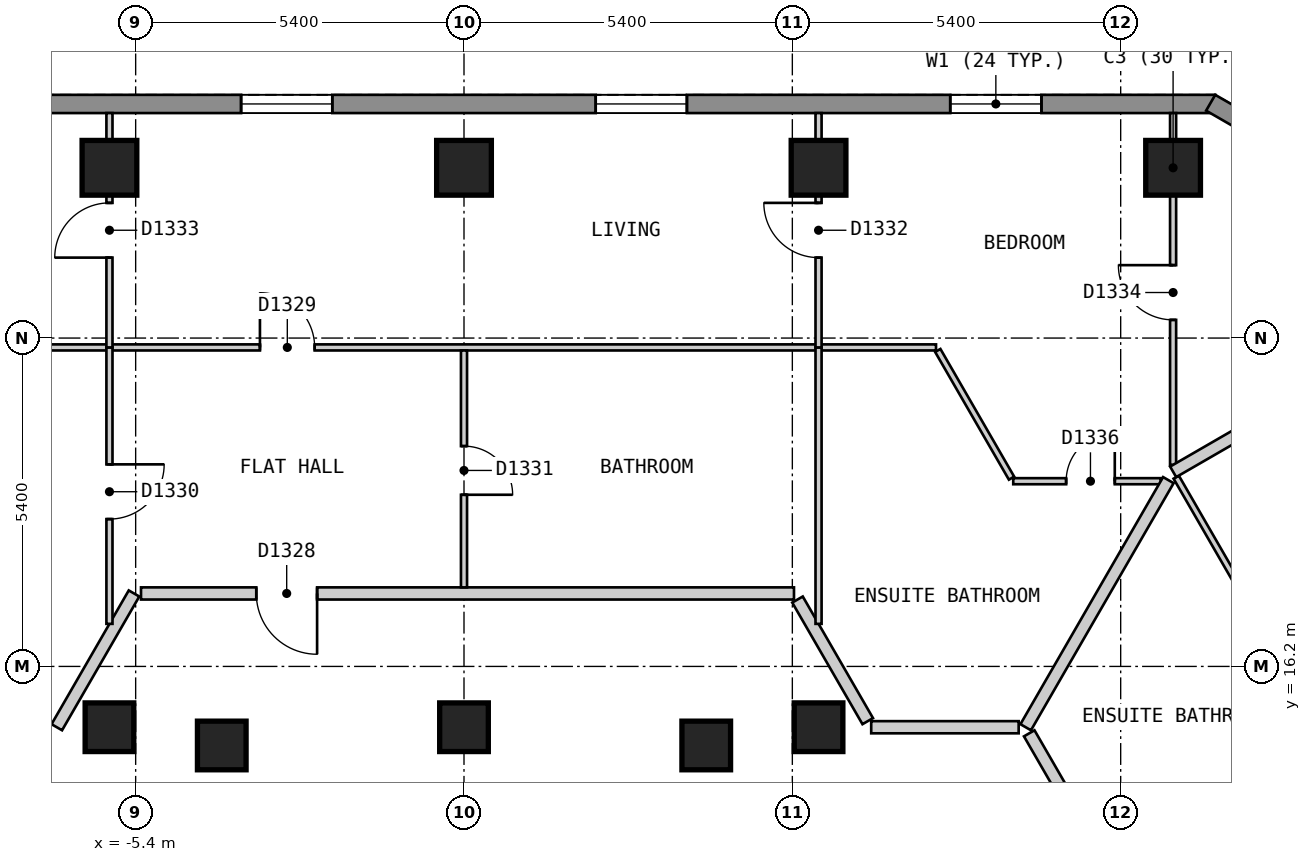
"""IFC4 building model, lengths in metres.
Left out: names, types, materials, properties, quantities, classifications, styles, units other than length and angle.
Written with IfcOpenShell. Run it as: python <this file> out.ifc"""

import sys

from ifc_helpers import new_model, si_unit, direction, frame, frame_2d, origin, origin_2d, place, context, subcontext, project, spatial, polyline, rectangle, outline, extrude, element, fill, save


model = new_model("IFC4")
c1 = context("Model", 3, precision=1e-05, world=origin(), true_north=direction((0.0, 1.0)))
c2 = subcontext(c1, "Body", "Model", "MODEL_VIEW")
j1 = project(units=[si_unit("LENGTHUNIT", "METRE"), si_unit("PLANEANGLEUNIT", "RADIAN")], contexts=[c1])
p1 = place(None, origin())
s1 = spatial("IfcSite", under=j1, at=p1, CompositionType="ELEMENT")
p2 = place(p1, origin())
s2 = spatial("IfcBuilding", under=s1, at=p2, CompositionType="ELEMENT")
p3 = place(p2, frame((0.0, 0.0, 147.6)))
s3 = spatial("IfcBuildingStorey", under=s2, at=p3, CompositionType="ELEMENT", Elevation=147.6)
for number, where, z_axis, x_axis in (
    (1, (11.662, 24.4, 0.0), (0.0, 0.0, 1.0), (-1.0, 0.0, 0.0)),
    (2, (5.831, 24.4, 0.0), (0.0, 0.0, 1.0), (-1.0, 0.0, 0.0)),
    (3, (0.0, 24.4, 0.0), (0.0, 0.0, 1.0), (-1.0, 0.0, 0.0)),
    (4, (-5.831, 24.4, 0.0), (0.0, 0.0, 1.0), (-1.0, 0.0, 0.0)),
):
    element("IfcColumn", number, at=place(p3, frame(where, z_axis=z_axis, x_axis=x_axis)), inside=s3, PredefinedType="COLUMN", context=c2, shape_type="SweptSolid", body=[
        extrude(rectangle(XDim=0.9, YDim=0.9, at=origin_2d()), origin(), (0.0, 0.0, 1.0), 3.0),
    ])
for number, where, z_axis, x_axis in (
    (5, (5.831, 15.2, 0.0), (0.0, 0.0, 1.0), (-1.0, 0.0, 0.0)),
    (6, (3.984, 14.9, 0.0), (0.0, 0.0, 1.0), (1.0, 0.0, 0.0)),
    (7, (0.0, 15.2, 0.0), (0.0, 0.0, 1.0), (-1.0, 0.0, 0.0)),
    (8, (-3.984, 14.9, 0.0), (0.0, 0.0, 1.0), (1.0, 0.0, 0.0)),
    (9, (-5.831, 15.2, 0.0), (0.0, 0.0, 1.0), (-1.0, 0.0, 0.0)),
):
    element("IfcColumn", number, at=place(p3, frame(where, z_axis=z_axis, x_axis=x_axis)), inside=s3, PredefinedType="COLUMN", context=c2, shape_type="SweptSolid", body=[
        extrude(rectangle(XDim=0.8, YDim=0.8, at=origin_2d()), origin(), (0.0, 0.0, 1.0), 3.0),
    ])
p4 = place(p3, frame((12.355, 25.45, 0.0), z_axis=(0.0, 0.0, 1.0), x_axis=(-1.0, 0.0, 0.0)))
e10 = element("IfcWall", 10, at=p4, inside=s3, PredefinedType="SOLIDWALL", context=c2, shape_type="SweptSolid", body=[
    extrude(outline(polyline([(0.0, -0.15), (24.71, -0.15), (24.63, 0.15), (0.08, 0.15), (0.0, -0.15)])), origin(), (0.0, 0.0, 1.0), 2.7),
])
p5 = place(p4, frame((2.858, 0.0, 0.15)))
e11 = element("IfcOpeningElement", 11, at=p5, cuts=e10, PredefinedType="OPENING", context=c2, shape_type="SweptSolid", body=[
    extrude(rectangle(XDim=1.5, YDim=2.1, at=frame_2d((0.75, 1.05))), frame((0.0, 0.16, 0.0), z_axis=(0.0, -1.0, 0.0), x_axis=(1.0, 0.0, 0.0)), (0.0, 0.0, 1.0), 0.32),
])
p6 = place(p4, frame((8.689, 0.0, 0.15)))
e12 = element("IfcOpeningElement", 12, at=p6, cuts=e10, PredefinedType="OPENING", context=c2, shape_type="SweptSolid", body=[
    extrude(rectangle(XDim=1.5, YDim=2.1, at=frame_2d((0.75, 1.05))), frame((0.0, 0.16, 0.0), z_axis=(0.0, -1.0, 0.0), x_axis=(1.0, 0.0, 0.0)), (0.0, 0.0, 1.0), 0.32),
])
p7 = place(p4, frame((14.521, 0.0, 0.15)))
e13 = element("IfcOpeningElement", 13, at=p7, cuts=e10, PredefinedType="OPENING", context=c2, shape_type="SweptSolid", body=[
    extrude(rectangle(XDim=1.5, YDim=2.1, at=frame_2d((0.75, 1.05))), frame((0.0, 0.16, 0.0), z_axis=(0.0, -1.0, 0.0), x_axis=(1.0, 0.0, 0.0)), (0.0, 0.0, 1.0), 0.32),
])
p8 = place(p4, frame((20.352, 0.0, 0.15)))
e14 = element("IfcOpeningElement", 14, at=p8, cuts=e10, PredefinedType="OPENING", context=c2, shape_type="SweptSolid", body=[
    extrude(rectangle(XDim=1.5, YDim=2.1, at=frame_2d((0.75, 1.05))), frame((0.0, 0.16, 0.0), z_axis=(0.0, -1.0, 0.0), x_axis=(1.0, 0.0, 0.0)), (0.0, 0.0, 1.0), 0.32),
])
p9 = place(p3, frame((16.61, 22.97, 0.0), z_axis=(0.0, 0.0, 1.0), x_axis=(-0.866022959057, 0.500004234368, 0.0)))
e15 = element("IfcWall", 15, at=p9, inside=s3, PredefinedType="SOLIDWALL", context=c2, shape_type="SweptSolid", body=[
    extrude(outline(polyline([(0.0, -0.15), (5.0, -0.15), (4.92, 0.15), (0.08, 0.15), (0.0, -0.15)])), origin(), (0.0, 0.0, 1.0), 2.7),
])
p10 = place(p9, frame((0.65, 0.0, 0.15)))
e16 = element("IfcOpeningElement", 16, at=p10, cuts=e15, PredefinedType="OPENING", context=c2, shape_type="SweptSolid", body=[
    extrude(rectangle(XDim=1.2, YDim=2.1, at=frame_2d((0.6, 1.05))), frame((0.0, 0.16, 0.0), z_axis=(0.0, -1.0, 0.0), x_axis=(1.0, 0.0, 0.0)), (0.0, 0.0, 1.0), 0.32),
])
p11 = place(p3, frame((5.485, 17.3, 0.0), z_axis=(0.0, 0.0, 1.0), x_axis=(0.500027479704, -0.866009537788, 0.0)))
e17 = element("IfcWall", 17, at=p11, inside=s3, PredefinedType="PARTITIONING", context=c2, shape_type="SweptSolid", body=[
    extrude(rectangle(XDim=2.309, YDim=0.2, at=frame_2d((1.155, 0.0))), origin(), (0.0, 0.0, 1.0), 2.7),
])
p12 = place(p3, frame((9.296, 15.1, 0.0), z_axis=(0.0, 0.0, 1.0), x_axis=(0.499974024244, -0.866040400375, 0.0)))
e18 = element("IfcWall", 18, at=p12, inside=s3, PredefinedType="PARTITIONING", context=c2, shape_type="SweptSolid", body=[
    extrude(rectangle(XDim=16.857, YDim=0.2, at=frame_2d((8.429, 0.0))), origin(), (0.0, 0.0, 1.0), 2.7),
])
p13 = place(p12, frame((5.209, 0.0, 0.0)))
e19 = element("IfcOpeningElement", 19, at=p13, cuts=e18, PredefinedType="OPENING", context=c2, shape_type="SweptSolid", body=[
    extrude(rectangle(XDim=1.0, YDim=2.1, at=frame_2d((0.5, 1.05))), frame((0.0, 0.11, 0.0), z_axis=(0.0, -1.0, 0.0), x_axis=(1.0, 0.0, 0.0)), (0.0, 0.0, 1.0), 0.22),
])
p14 = place(p3, frame((6.697, 15.2, 0.0), z_axis=(0.0, 0.0, 1.0), x_axis=(1.0, 0.0, 0.0)))
e20 = element("IfcWall", 20, at=p14, inside=s3, PredefinedType="PARTITIONING", context=c2, shape_type="SweptSolid", body=[
    extrude(rectangle(XDim=2.425, YDim=0.2, at=frame_2d((1.212, 0.0))), origin(), (0.0, 0.0, 1.0), 2.7),
])
p15 = place(p3, frame((-5.312, 17.4, 0.0), z_axis=(0.0, 0.0, 1.0), x_axis=(1.0, 0.0, 0.0)))
e21 = element("IfcWall", 21, at=p15, inside=s3, PredefinedType="PARTITIONING", context=c2, shape_type="SweptSolid", body=[
    extrude(rectangle(XDim=10.739, YDim=0.2, at=frame_2d((5.37, 0.0))), origin(), (0.0, 0.0, 1.0), 2.7),
])
p16 = place(p15, frame((1.896, 0.0, 0.0)))
e22 = element("IfcOpeningElement", 22, at=p16, cuts=e21, PredefinedType="OPENING", context=c2, shape_type="SweptSolid", body=[
    extrude(rectangle(XDim=1.0, YDim=2.1, at=frame_2d((0.5, 1.05))), frame((0.0, 0.11, 0.0), z_axis=(0.0, -1.0, 0.0), x_axis=(1.0, 0.0, 0.0)), (0.0, 0.0, 1.0), 0.22),
])
p17 = place(p3, frame((-6.697, 15.2, 0.0), z_axis=(0.0, 0.0, 1.0), x_axis=(0.499963722229, 0.866046347752, 0.0)))
e23 = element("IfcWall", 23, at=p17, inside=s3, PredefinedType="PARTITIONING", context=c2, shape_type="SweptSolid", body=[
    extrude(rectangle(XDim=2.54, YDim=0.2, at=frame_2d((1.27, 0.0))), origin(), (0.0, 0.0, 1.0), 2.7),
])
p18 = place(p3, frame((7.792, 21.396, 0.0), z_axis=(0.0, 0.0, 1.0), x_axis=(0.50012328804, -0.865954211699, 0.0)))
e24 = element("IfcWall", 24, at=p18, inside=s3, PredefinedType="PARTITIONING", context=c2, shape_type="SweptSolid", body=[
    extrude(rectangle(XDim=2.425, YDim=0.1, at=frame_2d((1.213, 0.0))), origin(), (0.0, 0.0, 1.0), 2.7),
])
p19 = place(p3, frame((11.713, 19.313, 0.0), z_axis=(0.0, 0.0, 1.0), x_axis=(0.499999523185, -0.866025679073, 0.0)))
e25 = element("IfcWall", 25, at=p19, inside=s3, PredefinedType="PARTITIONING", context=c2, shape_type="SweptSolid", body=[
    extrude(rectangle(XDim=21.738, YDim=0.1, at=frame_2d((10.869, 0.0))), origin(), (0.0, 0.0, 1.0), 2.7),
])
p20 = place(p19, frame((7.654, 0.0, 0.0)))
e26 = element("IfcOpeningElement", 26, at=p20, cuts=e25, PredefinedType="OPENING", context=c2, shape_type="SweptSolid", body=[
    extrude(rectangle(XDim=0.9, YDim=2.1, at=frame_2d((0.45, 1.05))), frame((0.0, 0.06, 0.0), z_axis=(0.0, -1.0, 0.0), x_axis=(1.0, 0.0, 0.0)), (0.0, 0.0, 1.0), 0.12),
])
p21 = place(p19, frame((13.202, 0.0, 0.0)))
e27 = element("IfcOpeningElement", 27, at=p21, cuts=e25, PredefinedType="OPENING", context=c2, shape_type="SweptSolid", body=[
    extrude(rectangle(XDim=0.8, YDim=2.1, at=frame_2d((0.4, 1.05))), frame((0.0, 0.06, 0.0), z_axis=(0.0, -1.0, 0.0), x_axis=(1.0, 0.0, 0.0)), (0.0, 0.0, 1.0), 0.12),
])
p22 = place(p19, frame((2.242, 0.0, 0.0)))
e28 = element("IfcOpeningElement", 28, at=p22, cuts=e25, PredefinedType="OPENING", context=c2, shape_type="SweptSolid", body=[
    extrude(rectangle(XDim=0.8, YDim=2.1, at=frame_2d((0.4, 1.05))), frame((0.0, 0.06, 0.0), z_axis=(0.0, -1.0, 0.0), x_axis=(1.0, 0.0, 0.0)), (0.0, 0.0, 1.0), 0.12),
])
p23 = place(p19, frame((18.696, 0.0, 0.0)))
e29 = element("IfcOpeningElement", 29, at=p23, cuts=e25, PredefinedType="OPENING", context=c2, shape_type="SweptSolid", body=[
    extrude(rectangle(XDim=0.8, YDim=2.1, at=frame_2d((0.4, 1.05))), frame((0.0, 0.06, 0.0), z_axis=(0.0, -1.0, 0.0), x_axis=(1.0, 0.0, 0.0)), (0.0, 0.0, 1.0), 0.12),
])
p24 = place(p3, frame((9.033, 19.246, 0.0), z_axis=(0.0, 0.0, 1.0), x_axis=(1.0, 0.0, 0.0)))
e30 = element("IfcWall", 30, at=p24, inside=s3, PredefinedType="PARTITIONING", context=c2, shape_type="SweptSolid", body=[
    extrude(rectangle(XDim=2.425, YDim=0.1, at=frame_2d((1.212, 0.0))), origin(), (0.0, 0.0, 1.0), 2.7),
])
p25 = place(p24, frame((0.87, 0.0, 0.0)))
e31 = element("IfcOpeningElement", 31, at=p25, cuts=e30, PredefinedType="OPENING", context=c2, shape_type="SweptSolid", body=[
    extrude(rectangle(XDim=0.8, YDim=2.1, at=frame_2d((0.4, 1.05))), frame((0.0, 0.06, 0.0), z_axis=(0.0, -1.0, 0.0), x_axis=(1.0, 0.0, 0.0)), (0.0, 0.0, 1.0), 0.12),
])
p26 = place(p3, frame((-7.706, 21.446, 0.0), z_axis=(0.0, 0.0, 1.0), x_axis=(1.0, 0.0, 0.0)))
e32 = element("IfcWall", 32, at=p26, inside=s3, PredefinedType="PARTITIONING", context=c2, shape_type="SweptSolid", body=[
    extrude(rectangle(XDim=15.469, YDim=0.1, at=frame_2d((7.734, 0.0))), origin(), (0.0, 0.0, 1.0), 2.7),
])
p27 = place(p26, frame((4.35, 0.0, 0.0)))
e33 = element("IfcOpeningElement", 33, at=p27, cuts=e32, PredefinedType="OPENING", context=c2, shape_type="SweptSolid", body=[
    extrude(rectangle(XDim=0.9, YDim=2.1, at=frame_2d((0.45, 1.05))), frame((0.0, 0.06, 0.0), z_axis=(0.0, -1.0, 0.0), x_axis=(1.0, 0.0, 0.0)), (0.0, 0.0, 1.0), 0.12),
])
p28 = place(p3, frame((5.831, 16.9, 0.0), z_axis=(0.0, 0.0, 1.0), x_axis=(0.0, 1.0, 0.0)))
e34 = element("IfcWall", 34, at=p28, inside=s3, PredefinedType="PARTITIONING", context=c2, shape_type="SweptSolid", body=[
    extrude(rectangle(XDim=4.546, YDim=0.1, at=frame_2d((2.273, 0.0))), origin(), (0.0, 0.0, 1.0), 2.7),
])
p29 = place(p3, frame((11.662, 19.514, 0.0), z_axis=(0.0, 0.0, 1.0), x_axis=(0.0, 1.0, 0.0)))
e35 = element("IfcWall", 35, at=p29, inside=s3, PredefinedType="PARTITIONING", context=c2, shape_type="SweptSolid", body=[
    extrude(rectangle(XDim=5.786, YDim=0.1, at=frame_2d((2.893, 0.0))), origin(), (0.0, 0.0, 1.0), 2.7),
])
p30 = place(p29, frame((2.385, 0.0, 0.0)))
e36 = element("IfcOpeningElement", 36, at=p30, cuts=e35, PredefinedType="OPENING", context=c2, shape_type="SweptSolid", body=[
    extrude(rectangle(XDim=0.9, YDim=2.1, at=frame_2d((0.45, 1.05))), frame((0.0, 0.06, 0.0), z_axis=(0.0, -1.0, 0.0), x_axis=(1.0, 0.0, 0.0)), (0.0, 0.0, 1.0), 0.12),
])
p31 = place(p3, frame((0.0, 17.5, 0.0), z_axis=(0.0, 0.0, 1.0), x_axis=(0.0, 1.0, 0.0)))
e37 = element("IfcWall", 37, at=p31, inside=s3, PredefinedType="PARTITIONING", context=c2, shape_type="SweptSolid", body=[
    extrude(rectangle(XDim=3.896, YDim=0.1, at=frame_2d((1.948, 0.0))), origin(), (0.0, 0.0, 1.0), 2.7),
])
p32 = place(p31, frame((1.523, 0.0, 0.0)))
e38 = element("IfcOpeningElement", 38, at=p32, cuts=e37, PredefinedType="OPENING", context=c2, shape_type="SweptSolid", body=[
    extrude(rectangle(XDim=0.8, YDim=2.1, at=frame_2d((0.4, 1.05))), frame((0.0, 0.06, 0.0), z_axis=(0.0, -1.0, 0.0), x_axis=(1.0, 0.0, 0.0)), (0.0, 0.0, 1.0), 0.12),
])
p33 = place(p3, frame((-5.831, 16.9, 0.0), z_axis=(0.0, 0.0, 1.0), x_axis=(0.0, 1.0, 0.0)))
e39 = element("IfcWall", 39, at=p33, inside=s3, PredefinedType="PARTITIONING", context=c2, shape_type="SweptSolid", body=[
    extrude(rectangle(XDim=4.546, YDim=0.1, at=frame_2d((2.273, 0.0))), origin(), (0.0, 0.0, 1.0), 2.7),
])
p34 = place(p33, frame((1.723, 0.0, 0.0)))
e40 = element("IfcOpeningElement", 40, at=p34, cuts=e39, PredefinedType="OPENING", context=c2, shape_type="SweptSolid", body=[
    extrude(rectangle(XDim=0.9, YDim=2.1, at=frame_2d((0.45, 1.05))), frame((0.0, 0.06, 0.0), z_axis=(0.0, -1.0, 0.0), x_axis=(1.0, 0.0, 0.0)), (0.0, 0.0, 1.0), 0.12),
])
p35 = place(p3, frame((10.854, 12.6, 0.0), z_axis=(0.0, 0.0, 1.0), x_axis=(0.86606561423, 0.499930346997, 0.0)))
e41 = element("IfcWall", 41, at=p35, inside=s3, PredefinedType="PARTITIONING", context=c2, shape_type="SweptSolid", body=[
    extrude(rectangle(XDim=4.1, YDim=0.1, at=frame_2d((2.05, 0.0))), origin(), (0.0, 0.0, 1.0), 2.7),
])
p36 = place(p3, frame((9.238, 15.2, 0.0), z_axis=(0.0, 0.0, 1.0), x_axis=(0.49993863487, 0.86606083006, 0.0)))
e42 = element("IfcWall", 42, at=p36, inside=s3, PredefinedType="PARTITIONING", context=c2, shape_type="SweptSolid", body=[
    extrude(rectangle(XDim=4.692, YDim=0.2, at=frame_2d((2.346, 0.0))), origin(), (0.0, 0.0, 1.0), 2.7),
])
p37 = place(p3, frame((11.663, 19.4, 0.0), z_axis=(0.0, 0.0, 1.0), x_axis=(0.865941558533, 0.500145196124, 0.0)))
e43 = element("IfcWall", 43, at=p37, inside=s3, PredefinedType="PARTITIONING", context=c2, shape_type="SweptSolid", body=[
    extrude(rectangle(XDim=5.899, YDim=0.2, at=frame_2d((2.949, 0.0))), origin(), (0.0, 0.0, 1.0), 2.7),
])
p38 = place(p3, frame((5.831, 21.446, 0.0), z_axis=(0.0, 0.0, 1.0), x_axis=(0.0, 1.0, 0.0)))
e44 = element("IfcWall", 44, at=p38, inside=s3, PredefinedType="PARTITIONING", context=c2, shape_type="SweptSolid", body=[
    extrude(rectangle(XDim=3.854, YDim=0.1, at=frame_2d((1.927, 0.0))), origin(), (0.0, 0.0, 1.0), 2.7),
])
p39 = place(p38, frame((1.477, 0.0, 0.0)))
e45 = element("IfcOpeningElement", 45, at=p39, cuts=e44, PredefinedType="OPENING", context=c2, shape_type="SweptSolid", body=[
    extrude(rectangle(XDim=0.9, YDim=2.1, at=frame_2d((0.45, 1.05))), frame((0.0, 0.06, 0.0), z_axis=(0.0, -1.0, 0.0), x_axis=(1.0, 0.0, 0.0)), (0.0, 0.0, 1.0), 0.12),
])
p40 = place(p3, frame((-5.831, 21.446, 0.0), z_axis=(0.0, 0.0, 1.0), x_axis=(0.0, 1.0, 0.0)))
e46 = element("IfcWall", 46, at=p40, inside=s3, PredefinedType="PARTITIONING", context=c2, shape_type="SweptSolid", body=[
    extrude(rectangle(XDim=3.854, YDim=0.1, at=frame_2d((1.927, 0.0))), origin(), (0.0, 0.0, 1.0), 2.7),
])
p41 = place(p40, frame((1.477, 0.0, 0.0)))
e47 = element("IfcOpeningElement", 47, at=p41, cuts=e46, PredefinedType="OPENING", context=c2, shape_type="SweptSolid", body=[
    extrude(rectangle(XDim=0.9, YDim=2.1, at=frame_2d((0.45, 1.05))), frame((0.0, 0.06, 0.0), z_axis=(0.0, -1.0, 0.0), x_axis=(1.0, 0.0, 0.0)), (0.0, 0.0, 1.0), 0.12),
])
p42 = place(p5, origin())
e48 = element("IfcWindow", 48, at=p42, inside=s3, PartitioningType="SINGLE_PANEL", PredefinedType="WINDOW", context=c2, shape_type="SweptSolid", body=[
    extrude(rectangle(XDim=1.5, YDim=2.1, at=frame_2d((0.75, 1.05))), frame((0.0, 0.03, 0.0), z_axis=(0.0, -1.0, 0.0), x_axis=(1.0, 0.0, 0.0)), (0.0, 0.0, 1.0), 0.06),
])
fill(e11, e48)
p43 = place(p6, origin())
e49 = element("IfcWindow", 49, at=p43, inside=s3, PartitioningType="SINGLE_PANEL", PredefinedType="WINDOW", context=c2, shape_type="SweptSolid", body=[
    extrude(rectangle(XDim=1.5, YDim=2.1, at=frame_2d((0.75, 1.05))), frame((0.0, 0.03, 0.0), z_axis=(0.0, -1.0, 0.0), x_axis=(1.0, 0.0, 0.0)), (0.0, 0.0, 1.0), 0.06),
])
fill(e12, e49)
p44 = place(p7, origin())
e50 = element("IfcWindow", 50, at=p44, inside=s3, PartitioningType="SINGLE_PANEL", PredefinedType="WINDOW", context=c2, shape_type="SweptSolid", body=[
    extrude(rectangle(XDim=1.5, YDim=2.1, at=frame_2d((0.75, 1.05))), frame((0.0, 0.03, 0.0), z_axis=(0.0, -1.0, 0.0), x_axis=(1.0, 0.0, 0.0)), (0.0, 0.0, 1.0), 0.06),
])
fill(e13, e50)
p45 = place(p16, origin())
e51 = element("IfcDoor", 51, at=p45, inside=s3, OperationType="SINGLE_SWING_RIGHT", PredefinedType="DOOR", context=c2, shape_type="SweptSolid", body=[
    extrude(rectangle(XDim=1.0, YDim=2.1, at=frame_2d((0.5, 1.05))), frame((0.0, 0.025, 0.0), z_axis=(0.0, -1.0, 0.0), x_axis=(1.0, 0.0, 0.0)), (0.0, 0.0, 1.0), 0.05),
])
fill(e22, e51)
p46 = place(p27, origin())
e52 = element("IfcDoor", 52, at=p46, inside=s3, OperationType="SINGLE_SWING_LEFT", PredefinedType="DOOR", context=c2, shape_type="SweptSolid", body=[
    extrude(rectangle(XDim=0.9, YDim=2.1, at=frame_2d((0.45, 1.05))), frame((0.0, 0.025, 0.0), z_axis=(0.0, -1.0, 0.0), x_axis=(1.0, 0.0, 0.0)), (0.0, 0.0, 1.0), 0.05),
])
fill(e33, e52)
p47 = place(p34, origin())
e53 = element("IfcDoor", 53, at=p47, inside=s3, OperationType="SINGLE_SWING_RIGHT", PredefinedType="DOOR", context=c2, shape_type="SweptSolid", body=[
    extrude(rectangle(XDim=0.9, YDim=2.1, at=frame_2d((0.45, 1.05))), frame((0.0, 0.025, 0.0), z_axis=(0.0, -1.0, 0.0), x_axis=(1.0, 0.0, 0.0)), (0.0, 0.0, 1.0), 0.05),
])
fill(e40, e53)
p48 = place(p32, origin())
e54 = element("IfcDoor", 54, at=p48, inside=s3, OperationType="SINGLE_SWING_LEFT", PredefinedType="DOOR", context=c2, shape_type="SweptSolid", body=[
    extrude(rectangle(XDim=0.8, YDim=2.1, at=frame_2d((0.4, 1.05))), frame((0.0, 0.025, 0.0), z_axis=(0.0, -1.0, 0.0), x_axis=(1.0, 0.0, 0.0)), (0.0, 0.0, 1.0), 0.05),
])
fill(e38, e54)
p49 = place(p39, origin())
e55 = element("IfcDoor", 55, at=p49, inside=s3, OperationType="SINGLE_SWING_RIGHT", PredefinedType="DOOR", context=c2, shape_type="SweptSolid", body=[
    extrude(rectangle(XDim=0.9, YDim=2.1, at=frame_2d((0.45, 1.05))), frame((0.0, 0.025, 0.0), z_axis=(0.0, -1.0, 0.0), x_axis=(1.0, 0.0, 0.0)), (0.0, 0.0, 1.0), 0.05),
])
fill(e45, e55)
p50 = place(p41, origin())
e56 = element("IfcDoor", 56, at=p50, inside=s3, OperationType="SINGLE_SWING_LEFT", PredefinedType="DOOR", context=c2, shape_type="SweptSolid", body=[
    extrude(rectangle(XDim=0.9, YDim=2.1, at=frame_2d((0.45, 1.05))), frame((0.0, 0.025, 0.0), z_axis=(0.0, -1.0, 0.0), x_axis=(1.0, 0.0, 0.0)), (0.0, 0.0, 1.0), 0.05),
])
fill(e47, e56)
p51 = place(p30, origin())
e57 = element("IfcDoor", 57, at=p51, inside=s3, OperationType="SINGLE_SWING_RIGHT", PredefinedType="DOOR", context=c2, shape_type="SweptSolid", body=[
    extrude(rectangle(XDim=0.9, YDim=2.1, at=frame_2d((0.45, 1.05))), frame((0.0, 0.025, 0.0), z_axis=(0.0, -1.0, 0.0), x_axis=(1.0, 0.0, 0.0)), (0.0, 0.0, 1.0), 0.05),
])
fill(e36, e57)
p52 = place(p25, origin())
e58 = element("IfcDoor", 58, at=p52, inside=s3, OperationType="SINGLE_SWING_RIGHT", PredefinedType="DOOR", context=c2, shape_type="SweptSolid", body=[
    extrude(rectangle(XDim=0.8, YDim=2.1, at=frame_2d((0.4, 1.05))), frame((0.0, 0.025, 0.0), z_axis=(0.0, -1.0, 0.0), x_axis=(1.0, 0.0, 0.0)), (0.0, 0.0, 1.0), 0.05),
])
fill(e31, e58)
save(model, sys.argv[1])
